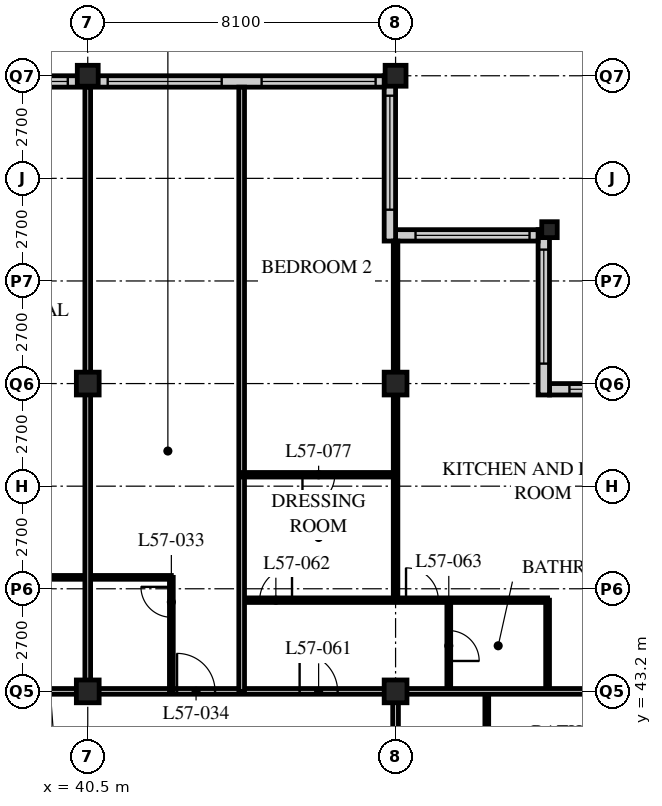
"""IFC4 building model, lengths in metres.
Left out: names, types, materials, properties, quantities, classifications, styles, units other than length and angle.
Written with IfcOpenShell. Run it as: python <this file> out.ifc"""

import sys

from ifc_helpers import new_model, si_unit, direction, frame, frame_2d, origin, origin_2d, place, context, subcontext, project, spatial, rectangle, hollow_rectangle, i_section, extrude, element, fill, save


model = new_model("IFC4")
c1 = context("Model", 3, precision=1e-05, world=origin(), true_north=direction((0.0, 1.0)))
c2 = subcontext(c1, "Body", "Model", "MODEL_VIEW")
j1 = project(units=[si_unit("LENGTHUNIT", "METRE"), si_unit("PLANEANGLEUNIT", "RADIAN")], contexts=[c1])
p1 = place(None, origin())
s1 = spatial("IfcSite", under=j1, at=p1, CompositionType="ELEMENT")
p2 = place(p1, origin())
s2 = spatial("IfcBuilding", under=s1, at=p2, CompositionType="ELEMENT")
p3 = place(p2, frame((0.0, 0.0, 220.8)))
s3 = spatial("IfcBuildingStorey", under=s2, at=p3, CompositionType="ELEMENT", Elevation=220.8)
for number, where, z_axis, x_axis in (
    (1, (40.5, 43.2, 0.0), (0.0, 0.0, 1.0), (1.0, 0.0, 0.0)),
    (2, (40.5, 51.3, 0.0), (0.0, 0.0, 1.0), (1.0, 0.0, 0.0)),
):
    element("IfcColumn", number, at=place(p3, frame(where, z_axis=z_axis, x_axis=x_axis)), inside=s3, PredefinedType="COLUMN", context=c2, shape_type="SweptSolid", body=[
        extrude(hollow_rectangle(XDim=0.6, YDim=0.6, WallThickness=0.05, at=origin_2d()), origin(), (0.0, 0.0, 1.0), 3.6),
    ])
p4 = place(p3, frame((40.5, 59.4, 0.0), z_axis=(0.0, 0.0, 1.0), x_axis=(1.0, 0.0, 0.0)))
e3 = element("IfcColumn", 3, at=p4, inside=s3, PredefinedType="COLUMN", context=c2, shape_type="SweptSolid", body=[
    extrude(hollow_rectangle(XDim=0.55, YDim=0.55, WallThickness=0.045, at=origin_2d()), origin(), (0.0, 0.0, 1.0), 3.6),
])
for number, where, z_axis, x_axis in (
    (4, (48.6, 43.2, 0.0), (0.0, 0.0, 1.0), (1.0, 0.0, 0.0)),
    (5, (48.6, 51.3, 0.0), (0.0, 0.0, 1.0), (1.0, 0.0, 0.0)),
):
    element("IfcColumn", number, at=place(p3, frame(where, z_axis=z_axis, x_axis=x_axis)), inside=s3, PredefinedType="COLUMN", context=c2, shape_type="SweptSolid", body=[
        extrude(hollow_rectangle(XDim=0.6, YDim=0.6, WallThickness=0.05, at=origin_2d()), origin(), (0.0, 0.0, 1.0), 3.6),
    ])
p5 = place(p3, frame((48.6, 59.4, 0.0), z_axis=(0.0, 0.0, 1.0), x_axis=(1.0, 0.0, 0.0)))
e6 = element("IfcColumn", 6, at=p5, inside=s3, PredefinedType="COLUMN", context=c2, shape_type="SweptSolid", body=[
    extrude(hollow_rectangle(XDim=0.55, YDim=0.55, WallThickness=0.045, at=origin_2d()), origin(), (0.0, 0.0, 1.0), 3.6),
])
p6 = place(p3, frame((52.65, 55.35, 0.0), z_axis=(0.0, 0.0, 1.0), x_axis=(1.0, 0.0, 0.0)))
e7 = element("IfcColumn", 7, at=p6, inside=s3, PredefinedType="COLUMN", context=c2, shape_type="SweptSolid", body=[
    extrude(i_section(OverallWidth=0.407, OverallDepth=0.419, WebThickness=0.031, FlangeThickness=0.049, FilletRadius=0.015, at=origin_2d()), origin(), (0.0, 0.0, 1.0), 3.6),
])
p7 = place(p3, frame((56.4, 51.15, 0.0), z_axis=(0.0, 0.0, 1.0), x_axis=(-1.0, 0.0, 0.0)))
e8 = element("IfcWall", 8, at=p7, inside=s3, PredefinedType="SOLIDWALL", context=c2, shape_type="SweptSolid", body=[
    extrude(rectangle(XDim=3.75, YDim=0.3, at=frame_2d((1.875, 0.0))), origin(), (0.0, 0.0, 1.0), 3.39),
])
p8 = place(p7, frame((0.225, 0.0, 0.6)))
e9 = element("IfcOpeningElement", 9, at=p8, cuts=e8, PredefinedType="OPENING", context=c2, shape_type="SweptSolid", body=[
    extrude(rectangle(XDim=3.0, YDim=2.0, at=frame_2d((1.5, 1.0))), frame((0.0, 0.16, 0.0), z_axis=(0.0, -1.0, 0.0), x_axis=(1.0, 0.0, 0.0)), (0.0, 0.0, 1.0), 0.32),
])
p9 = place(p3, frame((52.5, 51.0, 0.0), z_axis=(0.0, 0.0, 1.0), x_axis=(0.0, 1.0, 0.0)))
e10 = element("IfcWall", 10, at=p9, inside=s3, PredefinedType="SOLIDWALL", context=c2, shape_type="SweptSolid", body=[
    extrude(rectangle(XDim=4.35, YDim=0.3, at=frame_2d((2.175, 0.0))), origin(), (0.0, 0.0, 1.0), 3.39),
])
p10 = place(p9, frame((0.825, 0.0, 0.6)))
e11 = element("IfcOpeningElement", 11, at=p10, cuts=e10, PredefinedType="OPENING", context=c2, shape_type="SweptSolid", body=[
    extrude(rectangle(XDim=3.0, YDim=2.0, at=frame_2d((1.5, 1.0))), frame((0.0, 0.16, 0.0), z_axis=(0.0, -1.0, 0.0), x_axis=(1.0, 0.0, 0.0)), (0.0, 0.0, 1.0), 0.32),
])
p11 = place(p3, frame((52.35, 55.2, 0.0), z_axis=(0.0, 0.0, 1.0), x_axis=(-1.0, 0.0, 0.0)))
e12 = element("IfcWall", 12, at=p11, inside=s3, PredefinedType="SOLIDWALL", context=c2, shape_type="SweptSolid", body=[
    extrude(rectangle(XDim=3.75, YDim=0.3, at=frame_2d((1.875, 0.0))), origin(), (0.0, 0.0, 1.0), 3.39),
])
p12 = place(p11, frame((0.225, 0.0, 0.6)))
e13 = element("IfcOpeningElement", 13, at=p12, cuts=e12, PredefinedType="OPENING", context=c2, shape_type="SweptSolid", body=[
    extrude(rectangle(XDim=3.0, YDim=2.0, at=frame_2d((1.5, 1.0))), frame((0.0, 0.16, 0.0), z_axis=(0.0, -1.0, 0.0), x_axis=(1.0, 0.0, 0.0)), (0.0, 0.0, 1.0), 0.32),
])
p13 = place(p3, frame((48.45, 55.05, 0.0), z_axis=(0.0, 0.0, 1.0), x_axis=(0.0, 1.0, 0.0)))
e14 = element("IfcWall", 14, at=p13, inside=s3, PredefinedType="SOLIDWALL", context=c2, shape_type="SweptSolid", body=[
    extrude(rectangle(XDim=4.35, YDim=0.3, at=frame_2d((2.175, 0.0))), origin(), (0.0, 0.0, 1.0), 3.39),
])
p14 = place(p13, frame((0.825, 0.0, 0.6)))
e15 = element("IfcOpeningElement", 15, at=p14, cuts=e14, PredefinedType="OPENING", context=c2, shape_type="SweptSolid", body=[
    extrude(rectangle(XDim=3.0, YDim=2.0, at=frame_2d((1.5, 1.0))), frame((0.0, 0.16, 0.0), z_axis=(0.0, -1.0, 0.0), x_axis=(1.0, 0.0, 0.0)), (0.0, 0.0, 1.0), 0.32),
])
p15 = place(p3, frame((48.3, 59.25, 0.0), z_axis=(0.0, 0.0, 1.0), x_axis=(-1.0, 0.0, 0.0)))
e16 = element("IfcWall", 16, at=p15, inside=s3, PredefinedType="SOLIDWALL", context=c2, shape_type="SweptSolid", body=[
    extrude(rectangle(XDim=40.2, YDim=0.3, at=frame_2d((20.1, 0.0))), origin(), (0.0, 0.0, 1.0), 3.39),
])
p16 = place(p15, frame((0.225, 0.0, 0.6)))
e17 = element("IfcOpeningElement", 17, at=p16, cuts=e16, PredefinedType="OPENING", context=c2, shape_type="SweptSolid", body=[
    extrude(rectangle(XDim=3.0, YDim=2.0, at=frame_2d((1.5, 1.0))), frame((0.0, 0.16, 0.0), z_axis=(0.0, -1.0, 0.0), x_axis=(1.0, 0.0, 0.0)), (0.0, 0.0, 1.0), 0.32),
])
p17 = place(p15, frame((4.275, 0.0, 0.6)))
e18 = element("IfcOpeningElement", 18, at=p17, cuts=e16, PredefinedType="OPENING", context=c2, shape_type="SweptSolid", body=[
    extrude(rectangle(XDim=3.0, YDim=2.0, at=frame_2d((1.5, 1.0))), frame((0.0, 0.16, 0.0), z_axis=(0.0, -1.0, 0.0), x_axis=(1.0, 0.0, 0.0)), (0.0, 0.0, 1.0), 0.32),
])
p18 = place(p15, frame((8.325, 0.0, 0.6)))
e19 = element("IfcOpeningElement", 19, at=p18, cuts=e16, PredefinedType="OPENING", context=c2, shape_type="SweptSolid", body=[
    extrude(rectangle(XDim=3.0, YDim=2.0, at=frame_2d((1.5, 1.0))), frame((0.0, 0.16, 0.0), z_axis=(0.0, -1.0, 0.0), x_axis=(1.0, 0.0, 0.0)), (0.0, 0.0, 1.0), 0.32),
])
p19 = place(p15, frame((12.375, 0.0, 0.6)))
e20 = element("IfcOpeningElement", 20, at=p19, cuts=e16, PredefinedType="OPENING", context=c2, shape_type="SweptSolid", body=[
    extrude(rectangle(XDim=3.0, YDim=2.0, at=frame_2d((1.5, 1.0))), frame((0.0, 0.16, 0.0), z_axis=(0.0, -1.0, 0.0), x_axis=(1.0, 0.0, 0.0)), (0.0, 0.0, 1.0), 0.32),
])
p20 = place(p15, frame((16.425, 0.0, 0.6)))
e21 = element("IfcOpeningElement", 21, at=p20, cuts=e16, PredefinedType="OPENING", context=c2, shape_type="SweptSolid", body=[
    extrude(rectangle(XDim=3.0, YDim=2.0, at=frame_2d((1.5, 1.0))), frame((0.0, 0.16, 0.0), z_axis=(0.0, -1.0, 0.0), x_axis=(1.0, 0.0, 0.0)), (0.0, 0.0, 1.0), 0.32),
])
p21 = place(p15, frame((20.475, 0.0, 0.6)))
e22 = element("IfcOpeningElement", 22, at=p21, cuts=e16, PredefinedType="OPENING", context=c2, shape_type="SweptSolid", body=[
    extrude(rectangle(XDim=3.0, YDim=2.0, at=frame_2d((1.5, 1.0))), frame((0.0, 0.16, 0.0), z_axis=(0.0, -1.0, 0.0), x_axis=(1.0, 0.0, 0.0)), (0.0, 0.0, 1.0), 0.32),
])
p22 = place(p15, frame((24.525, 0.0, 0.6)))
e23 = element("IfcOpeningElement", 23, at=p22, cuts=e16, PredefinedType="OPENING", context=c2, shape_type="SweptSolid", body=[
    extrude(rectangle(XDim=3.0, YDim=2.0, at=frame_2d((1.5, 1.0))), frame((0.0, 0.16, 0.0), z_axis=(0.0, -1.0, 0.0), x_axis=(1.0, 0.0, 0.0)), (0.0, 0.0, 1.0), 0.32),
])
p23 = place(p15, frame((28.575, 0.0, 0.6)))
e24 = element("IfcOpeningElement", 24, at=p23, cuts=e16, PredefinedType="OPENING", context=c2, shape_type="SweptSolid", body=[
    extrude(rectangle(XDim=3.0, YDim=2.0, at=frame_2d((1.5, 1.0))), frame((0.0, 0.16, 0.0), z_axis=(0.0, -1.0, 0.0), x_axis=(1.0, 0.0, 0.0)), (0.0, 0.0, 1.0), 0.32),
])
p24 = place(p15, frame((32.625, 0.0, 0.6)))
e25 = element("IfcOpeningElement", 25, at=p24, cuts=e16, PredefinedType="OPENING", context=c2, shape_type="SweptSolid", body=[
    extrude(rectangle(XDim=3.0, YDim=2.0, at=frame_2d((1.5, 1.0))), frame((0.0, 0.16, 0.0), z_axis=(0.0, -1.0, 0.0), x_axis=(1.0, 0.0, 0.0)), (0.0, 0.0, 1.0), 0.32),
])
p25 = place(p15, frame((36.675, 0.0, 0.6)))
e26 = element("IfcOpeningElement", 26, at=p25, cuts=e16, PredefinedType="OPENING", context=c2, shape_type="SweptSolid", body=[
    extrude(rectangle(XDim=3.0, YDim=2.0, at=frame_2d((1.5, 1.0))), frame((0.0, 0.16, 0.0), z_axis=(0.0, -1.0, 0.0), x_axis=(1.0, 0.0, 0.0)), (0.0, 0.0, 1.0), 0.32),
])
p26 = place(p3, frame((12.15, 43.2, 0.0), z_axis=(0.0, 0.0, 1.0), x_axis=(1.0, 0.0, 0.0)))
e27 = element("IfcWall", 27, at=p26, inside=s3, PredefinedType="PARTITIONING", context=c2, shape_type="SweptSolid", body=[
    extrude(rectangle(XDim=36.45, YDim=0.15, at=frame_2d((18.225, 0.0))), origin(), (0.0, 0.0, 1.0), 2.628),
])
p27 = place(p26, frame((4.95, 0.0, 0.0)))
e28 = element("IfcOpeningElement", 28, at=p27, cuts=e27, PredefinedType="OPENING", context=c2, shape_type="SweptSolid", body=[
    extrude(rectangle(XDim=1.0, YDim=2.1, at=frame_2d((0.5, 1.05))), frame((0.0, 0.085, 0.0), z_axis=(0.0, -1.0, 0.0), x_axis=(1.0, 0.0, 0.0)), (0.0, 0.0, 1.0), 0.17),
])
p28 = place(p26, frame((25.0, 0.0, 0.0)))
e29 = element("IfcOpeningElement", 29, at=p28, cuts=e27, PredefinedType="OPENING", context=c2, shape_type="SweptSolid", body=[
    extrude(rectangle(XDim=1.0, YDim=2.1, at=frame_2d((0.5, 1.05))), frame((0.0, 0.085, 0.0), z_axis=(0.0, -1.0, 0.0), x_axis=(1.0, 0.0, 0.0)), (0.0, 0.0, 1.0), 0.17),
])
p29 = place(p26, frame((30.7, 0.0, 0.0)))
e30 = element("IfcOpeningElement", 30, at=p29, cuts=e27, PredefinedType="OPENING", context=c2, shape_type="SweptSolid", body=[
    extrude(rectangle(XDim=1.0, YDim=2.1, at=frame_2d((0.5, 1.05))), frame((0.0, 0.085, 0.0), z_axis=(0.0, -1.0, 0.0), x_axis=(1.0, 0.0, 0.0)), (0.0, 0.0, 1.0), 0.17),
])
p30 = place(p26, frame((33.925, 0.0, 0.0)))
e31 = element("IfcOpeningElement", 31, at=p30, cuts=e27, PredefinedType="OPENING", context=c2, shape_type="SweptSolid", body=[
    extrude(rectangle(XDim=1.0, YDim=2.1, at=frame_2d((0.5, 1.05))), frame((0.0, 0.085, 0.0), z_axis=(0.0, -1.0, 0.0), x_axis=(1.0, 0.0, 0.0)), (0.0, 0.0, 1.0), 0.17),
])
p31 = place(p26, frame((1.525, 0.0, 0.0)))
e32 = element("IfcOpeningElement", 32, at=p31, cuts=e27, PredefinedType="OPENING", context=c2, shape_type="SweptSolid", body=[
    extrude(rectangle(XDim=1.0, YDim=2.1, at=frame_2d((0.5, 1.05))), frame((0.0, 0.085, 0.0), z_axis=(0.0, -1.0, 0.0), x_axis=(1.0, 0.0, 0.0)), (0.0, 0.0, 1.0), 0.17),
])
p32 = place(p3, frame((48.6, 18.9, 0.0), z_axis=(0.0, 0.0, 1.0), x_axis=(0.0, 1.0, 0.0)))
e33 = element("IfcWall", 33, at=p32, inside=s3, PredefinedType="PARTITIONING", context=c2, shape_type="SweptSolid", body=[
    extrude(rectangle(XDim=24.3, YDim=0.15, at=frame_2d((12.15, 0.0))), origin(), (0.0, 0.0, 1.0), 2.628),
])
p33 = place(p32, frame((0.9, 0.0, 0.0)))
e34 = element("IfcOpeningElement", 34, at=p33, cuts=e33, PredefinedType="OPENING", context=c2, shape_type="SweptSolid", body=[
    extrude(rectangle(XDim=1.0, YDim=2.1, at=frame_2d((0.5, 1.05))), frame((0.0, 0.085, 0.0), z_axis=(0.0, -1.0, 0.0), x_axis=(1.0, 0.0, 0.0)), (0.0, 0.0, 1.0), 0.17),
])
p34 = place(p32, frame((20.95, 0.0, 0.0)))
e35 = element("IfcOpeningElement", 35, at=p34, cuts=e33, PredefinedType="OPENING", context=c2, shape_type="SweptSolid", body=[
    extrude(rectangle(XDim=1.0, YDim=2.1, at=frame_2d((0.5, 1.05))), frame((0.0, 0.085, 0.0), z_axis=(0.0, -1.0, 0.0), x_axis=(1.0, 0.0, 0.0)), (0.0, 0.0, 1.0), 0.17),
])
p35 = place(p3, frame((38.3, 46.2, 0.0), z_axis=(0.0, 0.0, 1.0), x_axis=(1.0, 0.0, 0.0)))
e36 = element("IfcWall", 36, at=p35, inside=s3, PredefinedType="PARTITIONING", context=c2, shape_type="SweptSolid", body=[
    extrude(rectangle(XDim=4.4, YDim=0.1, at=frame_2d((2.2, 0.0))), origin(), (0.0, 0.0, 1.0), 3.39),
])
p36 = place(p3, frame((40.5, 43.2, 0.0), z_axis=(0.0, 0.0, 1.0), x_axis=(0.0, 1.0, 0.0)))
e37 = element("IfcWall", 37, at=p36, inside=s3, PredefinedType="PARTITIONING", context=c2, shape_type="SweptSolid", body=[
    extrude(rectangle(XDim=15.9, YDim=0.15, at=frame_2d((7.95, 0.0))), origin(), (0.0, 0.0, 1.0), 2.628),
])
p37 = place(p3, frame((42.7, 43.2, 0.0), z_axis=(0.0, 0.0, 1.0), x_axis=(0.0, 1.0, 0.0)))
e38 = element("IfcWall", 38, at=p37, inside=s3, PredefinedType="PARTITIONING", context=c2, shape_type="SweptSolid", body=[
    extrude(rectangle(XDim=3.0, YDim=0.1, at=frame_2d((1.5, 0.0))), origin(), (0.0, 0.0, 1.0), 3.39),
])
p38 = place(p37, frame((1.95, 0.0, 0.0)))
e39 = element("IfcOpeningElement", 39, at=p38, cuts=e38, PredefinedType="OPENING", context=c2, shape_type="SweptSolid", body=[
    extrude(rectangle(XDim=0.8, YDim=2.1, at=frame_2d((0.4, 1.05))), frame((0.0, 0.06, 0.0), z_axis=(0.0, -1.0, 0.0), x_axis=(1.0, 0.0, 0.0)), (0.0, 0.0, 1.0), 0.12),
])
p39 = place(p3, frame((51.0, 41.0, 0.0), z_axis=(0.0, 0.0, 1.0), x_axis=(0.0, 1.0, 0.0)))
e40 = element("IfcWall", 40, at=p39, inside=s3, PredefinedType="PARTITIONING", context=c2, shape_type="SweptSolid", body=[
    extrude(rectangle(XDim=2.2, YDim=0.1, at=frame_2d((1.1, 0.0))), origin(), (0.0, 0.0, 1.0), 3.39),
])
p40 = place(p3, frame((44.55, 45.6, 0.0), z_axis=(0.0, 0.0, 1.0), x_axis=(1.0, 0.0, 0.0)))
e41 = element("IfcWall", 41, at=p40, inside=s3, PredefinedType="PARTITIONING", context=c2, shape_type="SweptSolid", body=[
    extrude(rectangle(XDim=8.05, YDim=0.12, at=frame_2d((4.025, 0.0))), origin(), (0.0, 0.0, 1.0), 3.39),
])
p41 = place(p40, frame((0.475, 0.0, 0.0)))
e42 = element("IfcOpeningElement", 42, at=p41, cuts=e41, PredefinedType="OPENING", context=c2, shape_type="SweptSolid", body=[
    extrude(rectangle(XDim=0.85, YDim=2.1, at=frame_2d((0.425, 1.05))), frame((0.0, 0.07, 0.0), z_axis=(0.0, -1.0, 0.0), x_axis=(1.0, 0.0, 0.0)), (0.0, 0.0, 1.0), 0.14),
])
p42 = place(p40, frame((4.325, 0.0, 0.0)))
e43 = element("IfcOpeningElement", 43, at=p42, cuts=e41, PredefinedType="OPENING", context=c2, shape_type="SweptSolid", body=[
    extrude(rectangle(XDim=0.85, YDim=2.1, at=frame_2d((0.425, 1.05))), frame((0.0, 0.07, 0.0), z_axis=(0.0, -1.0, 0.0), x_axis=(1.0, 0.0, 0.0)), (0.0, 0.0, 1.0), 0.14),
])
p43 = place(p3, frame((50.0, 43.2, 0.0), z_axis=(0.0, 0.0, 1.0), x_axis=(0.0, 1.0, 0.0)))
e44 = element("IfcWall", 44, at=p43, inside=s3, PredefinedType="PARTITIONING", context=c2, shape_type="SweptSolid", body=[
    extrude(rectangle(XDim=2.4, YDim=0.1, at=frame_2d((1.2, 0.0))), origin(), (0.0, 0.0, 1.0), 3.39),
])
p44 = place(p43, frame((0.8, 0.0, 0.0)))
e45 = element("IfcOpeningElement", 45, at=p44, cuts=e44, PredefinedType="OPENING", context=c2, shape_type="SweptSolid", body=[
    extrude(rectangle(XDim=0.8, YDim=2.1, at=frame_2d((0.4, 1.05))), frame((0.0, 0.06, 0.0), z_axis=(0.0, -1.0, 0.0), x_axis=(1.0, 0.0, 0.0)), (0.0, 0.0, 1.0), 0.12),
])
p45 = place(p3, frame((52.6, 43.2, 0.0), z_axis=(0.0, 0.0, 1.0), x_axis=(0.0, 1.0, 0.0)))
e46 = element("IfcWall", 46, at=p45, inside=s3, PredefinedType="PARTITIONING", context=c2, shape_type="SweptSolid", body=[
    extrude(rectangle(XDim=2.4, YDim=0.1, at=frame_2d((1.2, 0.0))), origin(), (0.0, 0.0, 1.0), 3.39),
])
p46 = place(p3, frame((48.6, 45.6, 0.0), z_axis=(0.0, 0.0, 1.0), x_axis=(0.0, 1.0, 0.0)))
e47 = element("IfcWall", 47, at=p46, inside=s3, PredefinedType="PARTITIONING", context=c2, shape_type="SweptSolid", body=[
    extrude(rectangle(XDim=9.45, YDim=0.12, at=frame_2d((4.725, 0.0))), origin(), (0.0, 0.0, 1.0), 2.628),
])
p47 = place(p3, frame((48.6, 43.2, 0.0), z_axis=(0.0, 0.0, 1.0), x_axis=(1.0, 0.0, 0.0)))
e48 = element("IfcWall", 48, at=p47, inside=s3, PredefinedType="PARTITIONING", context=c2, shape_type="SweptSolid", body=[
    extrude(rectangle(XDim=7.8, YDim=0.15, at=frame_2d((3.9, 0.0))), origin(), (0.0, 0.0, 1.0), 2.628),
])
p48 = place(p3, frame((44.55, 43.2, 0.0), z_axis=(0.0, 0.0, 1.0), x_axis=(0.0, 1.0, 0.0)))
e49 = element("IfcWall", 49, at=p48, inside=s3, PredefinedType="PARTITIONING", context=c2, shape_type="SweptSolid", body=[
    extrude(rectangle(XDim=15.9, YDim=0.15, at=frame_2d((7.95, 0.0))), origin(), (0.0, 0.0, 1.0), 3.39),
])
p49 = place(p3, frame((44.55, 48.9, 0.0), z_axis=(0.0, 0.0, 1.0), x_axis=(1.0, 0.0, 0.0)))
e50 = element("IfcWall", 50, at=p49, inside=s3, PredefinedType="PARTITIONING", context=c2, shape_type="SweptSolid", body=[
    extrude(rectangle(XDim=4.05, YDim=0.12, at=frame_2d((2.025, 0.0))), origin(), (0.0, 0.0, 1.0), 3.39),
])
p50 = place(p49, frame((1.6, 0.0, 0.0)))
e51 = element("IfcOpeningElement", 51, at=p50, cuts=e50, PredefinedType="OPENING", context=c2, shape_type="SweptSolid", body=[
    extrude(rectangle(XDim=0.85, YDim=2.1, at=frame_2d((0.425, 1.05))), frame((0.0, 0.07, 0.0), z_axis=(0.0, -1.0, 0.0), x_axis=(1.0, 0.0, 0.0)), (0.0, 0.0, 1.0), 0.14),
])
p51 = place(p8, origin())
e52 = element("IfcWindow", 52, at=p51, inside=s3, PartitioningType="SINGLE_PANEL", PredefinedType="WINDOW", context=c2, shape_type="SweptSolid", body=[
    extrude(rectangle(XDim=3.0, YDim=2.0, at=frame_2d((1.5, 1.0))), frame((0.0, 0.03, 0.0), z_axis=(0.0, -1.0, 0.0), x_axis=(1.0, 0.0, 0.0)), (0.0, 0.0, 1.0), 0.06),
])
fill(e9, e52)
p52 = place(p10, origin())
e53 = element("IfcWindow", 53, at=p52, inside=s3, PartitioningType="SINGLE_PANEL", PredefinedType="WINDOW", context=c2, shape_type="SweptSolid", body=[
    extrude(rectangle(XDim=3.0, YDim=2.0, at=frame_2d((1.5, 1.0))), frame((0.0, 0.03, 0.0), z_axis=(0.0, -1.0, 0.0), x_axis=(1.0, 0.0, 0.0)), (0.0, 0.0, 1.0), 0.06),
])
fill(e11, e53)
p53 = place(p12, origin())
e54 = element("IfcWindow", 54, at=p53, inside=s3, PartitioningType="SINGLE_PANEL", PredefinedType="WINDOW", context=c2, shape_type="SweptSolid", body=[
    extrude(rectangle(XDim=3.0, YDim=2.0, at=frame_2d((1.5, 1.0))), frame((0.0, 0.03, 0.0), z_axis=(0.0, -1.0, 0.0), x_axis=(1.0, 0.0, 0.0)), (0.0, 0.0, 1.0), 0.06),
])
fill(e13, e54)
p54 = place(p14, origin())
e55 = element("IfcWindow", 55, at=p54, inside=s3, PartitioningType="SINGLE_PANEL", PredefinedType="WINDOW", context=c2, shape_type="SweptSolid", body=[
    extrude(rectangle(XDim=3.0, YDim=2.0, at=frame_2d((1.5, 1.0))), frame((0.0, 0.03, 0.0), z_axis=(0.0, -1.0, 0.0), x_axis=(1.0, 0.0, 0.0)), (0.0, 0.0, 1.0), 0.06),
])
fill(e15, e55)
p55 = place(p16, origin())
e56 = element("IfcWindow", 56, at=p55, inside=s3, PartitioningType="SINGLE_PANEL", PredefinedType="WINDOW", context=c2, shape_type="SweptSolid", body=[
    extrude(rectangle(XDim=3.0, YDim=2.0, at=frame_2d((1.5, 1.0))), frame((0.0, 0.03, 0.0), z_axis=(0.0, -1.0, 0.0), x_axis=(1.0, 0.0, 0.0)), (0.0, 0.0, 1.0), 0.06),
])
fill(e17, e56)
p56 = place(p17, origin())
e57 = element("IfcWindow", 57, at=p56, inside=s3, PartitioningType="SINGLE_PANEL", PredefinedType="WINDOW", context=c2, shape_type="SweptSolid", body=[
    extrude(rectangle(XDim=3.0, YDim=2.0, at=frame_2d((1.5, 1.0))), frame((0.0, 0.03, 0.0), z_axis=(0.0, -1.0, 0.0), x_axis=(1.0, 0.0, 0.0)), (0.0, 0.0, 1.0), 0.06),
])
fill(e18, e57)
p57 = place(p18, origin())
e58 = element("IfcWindow", 58, at=p57, inside=s3, PartitioningType="SINGLE_PANEL", PredefinedType="WINDOW", context=c2, shape_type="SweptSolid", body=[
    extrude(rectangle(XDim=3.0, YDim=2.0, at=frame_2d((1.5, 1.0))), frame((0.0, 0.03, 0.0), z_axis=(0.0, -1.0, 0.0), x_axis=(1.0, 0.0, 0.0)), (0.0, 0.0, 1.0), 0.06),
])
fill(e19, e58)
p58 = place(p38, origin())
e59 = element("IfcDoor", 59, at=p58, inside=s3, OperationType="SINGLE_SWING_RIGHT", PredefinedType="DOOR", context=c2, shape_type="SweptSolid", body=[
    extrude(rectangle(XDim=0.8, YDim=2.1, at=frame_2d((0.4, 1.05))), frame((0.0, 0.025, 0.0), z_axis=(0.0, -1.0, 0.0), x_axis=(1.0, 0.0, 0.0)), (0.0, 0.0, 1.0), 0.05),
])
fill(e39, e59)
p59 = place(p29, origin())
e60 = element("IfcDoor", 60, at=p59, inside=s3, OperationType="SINGLE_SWING_LEFT", PredefinedType="DOOR", context=c2, shape_type="SweptSolid", body=[
    extrude(rectangle(XDim=1.0, YDim=2.1, at=frame_2d((0.5, 1.05))), frame((0.0, 0.025, 0.0), z_axis=(0.0, -1.0, 0.0), x_axis=(1.0, 0.0, 0.0)), (0.0, 0.0, 1.0), 0.05),
])
fill(e30, e60)
p60 = place(p30, origin())
e61 = element("IfcDoor", 61, at=p60, inside=s3, OperationType="SINGLE_SWING_LEFT", PredefinedType="DOOR", context=c2, shape_type="SweptSolid", body=[
    extrude(rectangle(XDim=1.0, YDim=2.1, at=frame_2d((0.5, 1.05))), frame((0.0, 0.025, 0.0), z_axis=(0.0, -1.0, 0.0), x_axis=(1.0, 0.0, 0.0)), (0.0, 0.0, 1.0), 0.05),
])
fill(e31, e61)
p61 = place(p41, origin())
e62 = element("IfcDoor", 62, at=p61, inside=s3, OperationType="SINGLE_SWING_RIGHT", PredefinedType="DOOR", context=c2, shape_type="SweptSolid", body=[
    extrude(rectangle(XDim=0.85, YDim=2.1, at=frame_2d((0.425, 1.05))), frame((0.0, 0.025, 0.0), z_axis=(0.0, -1.0, 0.0), x_axis=(1.0, 0.0, 0.0)), (0.0, 0.0, 1.0), 0.05),
])
fill(e42, e62)
p62 = place(p44, origin())
e63 = element("IfcDoor", 63, at=p62, inside=s3, OperationType="SINGLE_SWING_RIGHT", PredefinedType="DOOR", context=c2, shape_type="SweptSolid", body=[
    extrude(rectangle(XDim=0.8, YDim=2.1, at=frame_2d((0.4, 1.05))), frame((0.0, 0.025, 0.0), z_axis=(0.0, -1.0, 0.0), x_axis=(1.0, 0.0, 0.0)), (0.0, 0.0, 1.0), 0.05),
])
fill(e45, e63)
p63 = place(p42, origin())
e64 = element("IfcDoor", 64, at=p63, inside=s3, OperationType="SINGLE_SWING_LEFT", PredefinedType="DOOR", context=c2, shape_type="SweptSolid", body=[
    extrude(rectangle(XDim=0.85, YDim=2.1, at=frame_2d((0.425, 1.05))), frame((0.0, 0.025, 0.0), z_axis=(0.0, -1.0, 0.0), x_axis=(1.0, 0.0, 0.0)), (0.0, 0.0, 1.0), 0.05),
])
fill(e43, e64)
p64 = place(p50, origin())
e65 = element("IfcDoor", 65, at=p64, inside=s3, OperationType="SINGLE_SWING_RIGHT", PredefinedType="DOOR", context=c2, shape_type="SweptSolid", body=[
    extrude(rectangle(XDim=0.85, YDim=2.1, at=frame_2d((0.425, 1.05))), frame((0.0, 0.025, 0.0), z_axis=(0.0, -1.0, 0.0), x_axis=(1.0, 0.0, 0.0)), (0.0, 0.0, 1.0), 0.05),
])
fill(e51, e65)
save(model, sys.argv[1])
